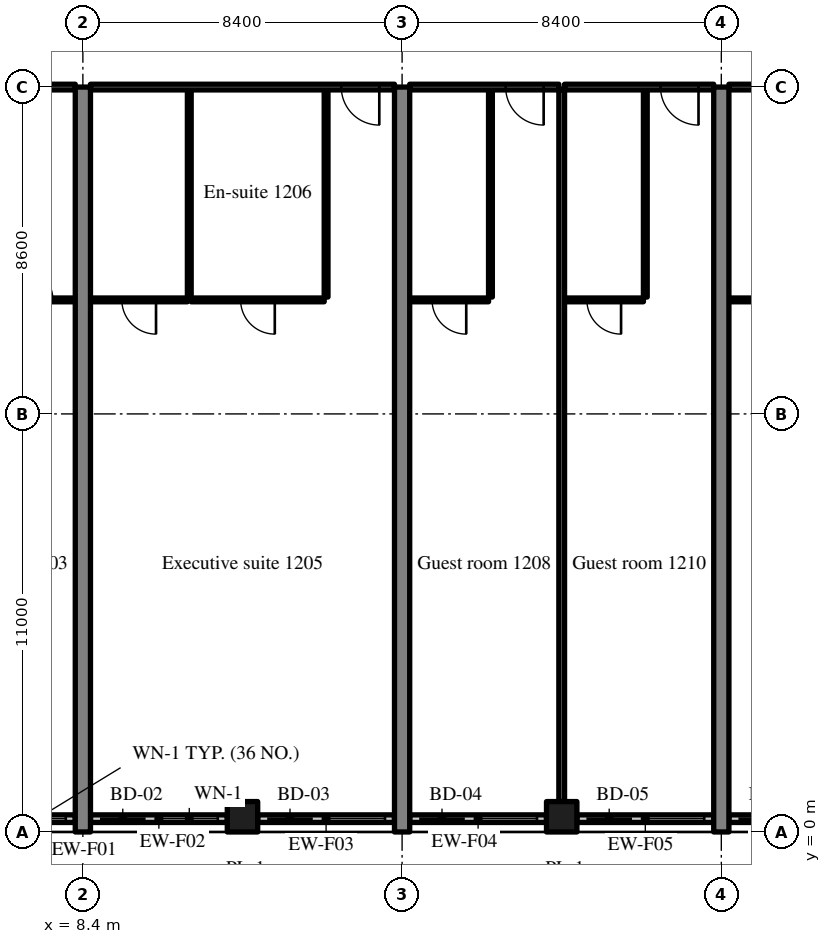
"""IFC4 building model, lengths in metres.
Left out: names, types, materials, properties, quantities, classifications, styles, units other than length and angle.
Written with IfcOpenShell. Run it as: python <this file> out.ifc"""

import sys

from ifc_helpers import new_model, si_unit, direction, frame, frame_2d, origin, origin_2d, place, context, subcontext, project, spatial, rectangle, extrude, source, transform, mapped, element, fill, save


model = new_model("IFC4")
c1 = context("Model", 3, precision=1e-05, world=origin(), true_north=direction((0.0, 1.0)))
c2 = subcontext(c1, "Body", "Model", "MODEL_VIEW")
j1 = project(units=[si_unit("LENGTHUNIT", "METRE"), si_unit("PLANEANGLEUNIT", "RADIAN")], contexts=[c1])
p1 = place(None, origin())
s1 = spatial("IfcSite", under=j1, at=p1, CompositionType="ELEMENT")
p2 = place(p1, origin())
s2 = spatial("IfcBuilding", under=s1, at=p2, CompositionType="ELEMENT")
p3 = place(p2, frame((0.0, 0.0, 54.4)))
s3 = spatial("IfcBuildingStorey", under=s2, at=p3, CompositionType="ELEMENT", Elevation=54.4)
m1 = source(origin(), c2, "Body", "SweptSolid", [
    extrude(rectangle(XDim=19.6, YDim=0.4, at=frame_2d((9.8, 0.0))), origin(), (0.0, 0.0, 1.0), 3.52),
])
for number, where, z_axis, x_axis in (
    (1, (8.4, 0.0, 0.0), (0.0, 0.0, 1.0), (0.0, 1.0, 0.0)),
    (2, (16.8, 0.0, 0.0), (0.0, 0.0, 1.0), (0.0, 1.0, 0.0)),
    (3, (25.2, 0.0, 0.0), (0.0, 0.0, 1.0), (0.0, 1.0, 0.0)),
):
    element("IfcWall", number, at=place(p3, frame(where, z_axis=z_axis, x_axis=x_axis)), inside=s3, PredefinedType="SHEAR", context=c2, shape_type="MappedRepresentation", body=[
        mapped(m1, transform((0.0, 0.0, 0.0), scale=1.0)),
    ])
m2 = source(origin(), c2, "Body", "SweptSolid", [
    extrude(rectangle(XDim=0.8, YDim=0.8, at=origin_2d()), origin(), (0.0, 0.0, 1.0), 3.52),
])
for number, where, z_axis, x_axis in (
    (4, (12.6, 0.4, 0.0), (0.0, 0.0, 1.0), (1.0, 0.0, 0.0)),
    (5, (21.0, 0.4, 0.0), (0.0, 0.0, 1.0), (1.0, 0.0, 0.0)),
):
    element("IfcColumn", number, at=place(p3, frame(where, z_axis=z_axis, x_axis=x_axis)), inside=s3, PredefinedType="COLUMN", context=c2, shape_type="MappedRepresentation", body=[
        mapped(m2, transform((0.0, 0.0, 0.0), scale=1.0)),
    ])
m3 = source(origin(), c2, "Body", "SweptSolid", [
    extrude(rectangle(XDim=4.055, YDim=0.2, at=frame_2d((2.027, 0.0))), origin(), (0.0, 0.0, 1.0), 2.82),
])
p4 = place(p3, frame((4.145, 0.35, 0.0), z_axis=(0.0, 0.0, 1.0), x_axis=(1.0, 0.0, 0.0)))
e6 = element("IfcWall", 6, at=p4, inside=s3, PredefinedType="SOLIDWALL", context=c2, shape_type="MappedRepresentation", body=[
    mapped(m3, transform((0.0, 0.0, 0.0), scale=1.0)),
])
m4 = source(origin(), c2, "Body", "SweptSolid", [
    extrude(rectangle(XDim=1.2, YDim=2.4, at=frame_2d((0.6, 1.2))), frame((0.0, 0.11, 0.0), z_axis=(0.0, -1.0, 0.0), x_axis=(1.0, 0.0, 0.0)), (0.0, 0.0, 1.0), 0.22),
])
p5 = place(p4, frame((0.25, 0.0, 0.0)))
e7 = element("IfcOpeningElement", 7, at=p5, cuts=e6, PredefinedType="OPENING", context=c2, shape_type="MappedRepresentation", body=[
    mapped(m4, transform((0.0, 0.0, 0.0), scale=1.0)),
])
m5 = source(origin(), c2, "Body", "SweptSolid", [
    extrude(rectangle(XDim=1.5, YDim=1.5, at=frame_2d((0.75, 0.75))), frame((0.0, 0.11, 0.0), z_axis=(0.0, -1.0, 0.0), x_axis=(1.0, 0.0, 0.0)), (0.0, 0.0, 1.0), 0.22),
])
p6 = place(p4, frame((2.305, 0.0, 0.9)))
e8 = element("IfcOpeningElement", 8, at=p6, cuts=e6, PredefinedType="OPENING", context=c2, shape_type="MappedRepresentation", body=[
    mapped(m5, transform((0.0, 0.0, 0.0), scale=1.0)),
])
m6 = source(origin(), c2, "Body", "SweptSolid", [
    extrude(rectangle(XDim=3.6, YDim=0.2, at=frame_2d((1.8, 0.0))), origin(), (0.0, 0.0, 1.0), 2.82),
])
p7 = place(p3, frame((8.6, 0.35, 0.0), z_axis=(0.0, 0.0, 1.0), x_axis=(1.0, 0.0, 0.0)))
e9 = element("IfcWall", 9, at=p7, inside=s3, PredefinedType="SOLIDWALL", context=c2, shape_type="MappedRepresentation", body=[
    mapped(m6, transform((0.0, 0.0, 0.0), scale=1.0)),
])
p8 = place(p7, frame((0.25, 0.0, 0.0)))
e10 = element("IfcOpeningElement", 10, at=p8, cuts=e9, PredefinedType="OPENING", context=c2, shape_type="MappedRepresentation", body=[
    mapped(m4, transform((0.0, 0.0, 0.0), scale=1.0)),
])
p9 = place(p7, frame((1.85, 0.0, 0.9)))
e11 = element("IfcOpeningElement", 11, at=p9, cuts=e9, PredefinedType="OPENING", context=c2, shape_type="MappedRepresentation", body=[
    mapped(m5, transform((0.0, 0.0, 0.0), scale=1.0)),
])
m7 = source(origin(), c2, "Body", "SweptSolid", [
    extrude(rectangle(XDim=3.6, YDim=0.2, at=frame_2d((1.8, 0.0))), origin(), (0.0, 0.0, 1.0), 2.82),
])
p10 = place(p3, frame((13.0, 0.35, 0.0), z_axis=(0.0, 0.0, 1.0), x_axis=(1.0, 0.0, 0.0)))
e12 = element("IfcWall", 12, at=p10, inside=s3, PredefinedType="SOLIDWALL", context=c2, shape_type="MappedRepresentation", body=[
    mapped(m7, transform((0.0, 0.0, 0.0), scale=1.0)),
])
p11 = place(p10, frame((0.25, 0.0, 0.0)))
e13 = element("IfcOpeningElement", 13, at=p11, cuts=e12, PredefinedType="OPENING", context=c2, shape_type="MappedRepresentation", body=[
    mapped(m4, transform((0.0, 0.0, 0.0), scale=1.0)),
])
p12 = place(p10, frame((1.85, 0.0, 0.9)))
e14 = element("IfcOpeningElement", 14, at=p12, cuts=e12, PredefinedType="OPENING", context=c2, shape_type="MappedRepresentation", body=[
    mapped(m5, transform((0.0, 0.0, 0.0), scale=1.0)),
])
p13 = place(p3, frame((17.0, 0.35, 0.0), z_axis=(0.0, 0.0, 1.0), x_axis=(1.0, 0.0, 0.0)))
e15 = element("IfcWall", 15, at=p13, inside=s3, PredefinedType="SOLIDWALL", context=c2, shape_type="MappedRepresentation", body=[
    mapped(m7, transform((0.0, 0.0, 0.0), scale=1.0)),
])
p14 = place(p13, frame((0.25, 0.0, 0.0)))
e16 = element("IfcOpeningElement", 16, at=p14, cuts=e15, PredefinedType="OPENING", context=c2, shape_type="MappedRepresentation", body=[
    mapped(m4, transform((0.0, 0.0, 0.0), scale=1.0)),
])
p15 = place(p13, frame((1.85, 0.0, 0.9)))
e17 = element("IfcOpeningElement", 17, at=p15, cuts=e15, PredefinedType="OPENING", context=c2, shape_type="MappedRepresentation", body=[
    mapped(m5, transform((0.0, 0.0, 0.0), scale=1.0)),
])
p16 = place(p3, frame((21.4, 0.35, 0.0), z_axis=(0.0, 0.0, 1.0), x_axis=(1.0, 0.0, 0.0)))
e18 = element("IfcWall", 18, at=p16, inside=s3, PredefinedType="SOLIDWALL", context=c2, shape_type="MappedRepresentation", body=[
    mapped(m7, transform((0.0, 0.0, 0.0), scale=1.0)),
])
p17 = place(p16, frame((0.25, 0.0, 0.0)))
e19 = element("IfcOpeningElement", 19, at=p17, cuts=e18, PredefinedType="OPENING", context=c2, shape_type="MappedRepresentation", body=[
    mapped(m4, transform((0.0, 0.0, 0.0), scale=1.0)),
])
p18 = place(p16, frame((1.85, 0.0, 0.9)))
e20 = element("IfcOpeningElement", 20, at=p18, cuts=e18, PredefinedType="OPENING", context=c2, shape_type="MappedRepresentation", body=[
    mapped(m5, transform((0.0, 0.0, 0.0), scale=1.0)),
])
p19 = place(p3, frame((25.4, 0.35, 0.0), z_axis=(0.0, 0.0, 1.0), x_axis=(1.0, 0.0, 0.0)))
e21 = element("IfcWall", 21, at=p19, inside=s3, PredefinedType="SOLIDWALL", context=c2, shape_type="MappedRepresentation", body=[
    mapped(m7, transform((0.0, 0.0, 0.0), scale=1.0)),
])
p20 = place(p19, frame((0.25, 0.0, 0.0)))
e22 = element("IfcOpeningElement", 22, at=p20, cuts=e21, PredefinedType="OPENING", context=c2, shape_type="MappedRepresentation", body=[
    mapped(m4, transform((0.0, 0.0, 0.0), scale=1.0)),
])
p21 = place(p19, frame((1.85, 0.0, 0.9)))
e23 = element("IfcOpeningElement", 23, at=p21, cuts=e21, PredefinedType="OPENING", context=c2, shape_type="MappedRepresentation", body=[
    mapped(m5, transform((0.0, 0.0, 0.0), scale=1.0)),
])
m8 = source(origin(), c2, "Body", "SweptSolid", [
    extrude(rectangle(XDim=2.075, YDim=0.1, at=frame_2d((1.038, 0.0))), origin(), (0.0, 0.0, 1.0), 3.52),
])
p22 = place(p3, frame((6.125, 14.0, 0.0), z_axis=(0.0, 0.0, 1.0), x_axis=(1.0, 0.0, 0.0)))
e24 = element("IfcWall", 24, at=p22, inside=s3, PredefinedType="PARTITIONING", context=c2, shape_type="MappedRepresentation", body=[
    mapped(m8, transform((0.0, 0.0, 0.0), scale=1.0)),
])
m9 = source(origin(), c2, "Body", "SweptSolid", [
    extrude(rectangle(XDim=0.9, YDim=2.1, at=frame_2d((0.45, 1.05))), frame((0.0, 0.06, 0.0), z_axis=(0.0, -1.0, 0.0), x_axis=(1.0, 0.0, 0.0)), (0.0, 0.0, 1.0), 0.12),
])
p23 = place(p22, frame((0.587, 0.0, 0.0)))
e25 = element("IfcOpeningElement", 25, at=p23, cuts=e24, PredefinedType="OPENING", context=c2, shape_type="MappedRepresentation", body=[
    mapped(m9, transform((0.0, 0.0, 0.0), scale=1.0)),
])
m10 = source(origin(), c2, "Body", "SweptSolid", [
    extrude(rectangle(XDim=3.925, YDim=0.15, at=frame_2d((1.962, 0.0))), origin(), (0.0, 0.0, 1.0), 2.82),
])
p24 = place(p3, frame((4.275, 19.6, 0.0), z_axis=(0.0, 0.0, 1.0), x_axis=(1.0, 0.0, 0.0)))
e26 = element("IfcWall", 26, at=p24, inside=s3, PredefinedType="PARTITIONING", context=c2, shape_type="MappedRepresentation", body=[
    mapped(m10, transform((0.0, 0.0, 0.0), scale=1.0)),
])
m11 = source(origin(), c2, "Body", "SweptSolid", [
    extrude(rectangle(XDim=1.0, YDim=2.1, at=frame_2d((0.5, 1.05))), frame((0.0, 0.085, 0.0), z_axis=(0.0, -1.0, 0.0), x_axis=(1.0, 0.0, 0.0)), (0.0, 0.0, 1.0), 0.17),
])
p25 = place(p24, frame((0.4, 0.0, 0.0)))
e27 = element("IfcOpeningElement", 27, at=p25, cuts=e26, PredefinedType="OPENING", context=c2, shape_type="MappedRepresentation", body=[
    mapped(m11, transform((0.0, 0.0, 0.0), scale=1.0)),
])
m12 = source(origin(), c2, "Body", "SweptSolid", [
    extrude(rectangle(XDim=5.45, YDim=0.1, at=frame_2d((2.725, 0.0))), origin(), (0.0, 0.0, 1.0), 3.52),
])
for number, where, z_axis, x_axis in (
    (28, (14.8, 14.075, 0.0), (0.0, 0.0, 1.0), (0.0, 1.0, 0.0)),
    (29, (11.2, 14.075, 0.0), (0.0, 0.0, 1.0), (0.0, 1.0, 0.0)),
):
    element("IfcWall", number, at=place(p3, frame(where, z_axis=z_axis, x_axis=x_axis)), inside=s3, PredefinedType="PARTITIONING", context=c2, shape_type="MappedRepresentation", body=[
        mapped(m12, transform((0.0, 0.0, 0.0), scale=1.0)),
    ])
m13 = source(origin(), c2, "Body", "SweptSolid", [
    extrude(rectangle(XDim=3.5, YDim=0.1, at=frame_2d((1.75, 0.0))), origin(), (0.0, 0.0, 1.0), 3.52),
])
p26 = place(p3, frame((11.25, 14.0, 0.0), z_axis=(0.0, 0.0, 1.0), x_axis=(1.0, 0.0, 0.0)))
e30 = element("IfcWall", 30, at=p26, inside=s3, PredefinedType="PARTITIONING", context=c2, shape_type="MappedRepresentation", body=[
    mapped(m13, transform((0.0, 0.0, 0.0), scale=1.0)),
])
p27 = place(p26, frame((1.3, 0.0, 0.0)))
e31 = element("IfcOpeningElement", 31, at=p27, cuts=e30, PredefinedType="OPENING", context=c2, shape_type="MappedRepresentation", body=[
    mapped(m9, transform((0.0, 0.0, 0.0), scale=1.0)),
])
m14 = source(origin(), c2, "Body", "SweptSolid", [
    extrude(rectangle(XDim=2.55, YDim=0.1, at=frame_2d((1.275, 0.0))), origin(), (0.0, 0.0, 1.0), 3.52),
])
p28 = place(p3, frame((8.6, 14.0, 0.0), z_axis=(0.0, 0.0, 1.0), x_axis=(1.0, 0.0, 0.0)))
e32 = element("IfcWall", 32, at=p28, inside=s3, PredefinedType="PARTITIONING", context=c2, shape_type="MappedRepresentation", body=[
    mapped(m14, transform((0.0, 0.0, 0.0), scale=1.0)),
])
p29 = place(p28, frame((0.825, 0.0, 0.0)))
e33 = element("IfcOpeningElement", 33, at=p29, cuts=e32, PredefinedType="OPENING", context=c2, shape_type="MappedRepresentation", body=[
    mapped(m9, transform((0.0, 0.0, 0.0), scale=1.0)),
])
m15 = source(origin(), c2, "Body", "SweptSolid", [
    extrude(rectangle(XDim=8.0, YDim=0.15, at=frame_2d((4.0, 0.0))), origin(), (0.0, 0.0, 1.0), 2.82),
])
p30 = place(p3, frame((8.6, 19.6, 0.0), z_axis=(0.0, 0.0, 1.0), x_axis=(1.0, 0.0, 0.0)))
e34 = element("IfcWall", 34, at=p30, inside=s3, PredefinedType="PARTITIONING", context=c2, shape_type="MappedRepresentation", body=[
    mapped(m15, transform((0.0, 0.0, 0.0), scale=1.0)),
])
p31 = place(p30, frame((6.6, 0.0, 0.0)))
e35 = element("IfcOpeningElement", 35, at=p31, cuts=e34, PredefinedType="OPENING", context=c2, shape_type="MappedRepresentation", body=[
    mapped(m11, transform((0.0, 0.0, 0.0), scale=1.0)),
])
p32 = place(p3, frame((19.125, 14.075, 0.0), z_axis=(0.0, 0.0, 1.0), x_axis=(0.0, 1.0, 0.0)))
e36 = element("IfcWall", 36, at=p32, inside=s3, PredefinedType="PARTITIONING", context=c2, shape_type="MappedRepresentation", body=[
    mapped(m12, transform((0.0, 0.0, 0.0), scale=1.0)),
])
p33 = place(p3, frame((17.0, 14.0, 0.0), z_axis=(0.0, 0.0, 1.0), x_axis=(1.0, 0.0, 0.0)))
e37 = element("IfcWall", 37, at=p33, inside=s3, PredefinedType="PARTITIONING", context=c2, shape_type="MappedRepresentation", body=[
    mapped(m8, transform((0.0, 0.0, 0.0), scale=1.0)),
])
p34 = place(p33, frame((0.588, 0.0, 0.0)))
e38 = element("IfcOpeningElement", 38, at=p34, cuts=e37, PredefinedType="OPENING", context=c2, shape_type="MappedRepresentation", body=[
    mapped(m9, transform((0.0, 0.0, 0.0), scale=1.0)),
])
p35 = place(p3, frame((17.0, 19.6, 0.0), z_axis=(0.0, 0.0, 1.0), x_axis=(1.0, 0.0, 0.0)))
e39 = element("IfcWall", 39, at=p35, inside=s3, PredefinedType="PARTITIONING", context=c2, shape_type="MappedRepresentation", body=[
    mapped(m10, transform((0.0, 0.0, 0.0), scale=1.0)),
])
p36 = place(p35, frame((2.525, 0.0, 0.0)))
e40 = element("IfcOpeningElement", 40, at=p36, cuts=e39, PredefinedType="OPENING", context=c2, shape_type="MappedRepresentation", body=[
    mapped(m11, transform((0.0, 0.0, 0.0), scale=1.0)),
])
p37 = place(p3, frame((23.2, 14.075, 0.0), z_axis=(0.0, 0.0, 1.0), x_axis=(0.0, 1.0, 0.0)))
e41 = element("IfcWall", 41, at=p37, inside=s3, PredefinedType="PARTITIONING", context=c2, shape_type="MappedRepresentation", body=[
    mapped(m12, transform((0.0, 0.0, 0.0), scale=1.0)),
])
p38 = place(p3, frame((21.075, 14.0, 0.0), z_axis=(0.0, 0.0, 1.0), x_axis=(1.0, 0.0, 0.0)))
e42 = element("IfcWall", 42, at=p38, inside=s3, PredefinedType="PARTITIONING", context=c2, shape_type="MappedRepresentation", body=[
    mapped(m8, transform((0.0, 0.0, 0.0), scale=1.0)),
])
p39 = place(p38, frame((0.587, 0.0, 0.0)))
e43 = element("IfcOpeningElement", 43, at=p39, cuts=e42, PredefinedType="OPENING", context=c2, shape_type="MappedRepresentation", body=[
    mapped(m9, transform((0.0, 0.0, 0.0), scale=1.0)),
])
p40 = place(p3, frame((21.075, 19.6, 0.0), z_axis=(0.0, 0.0, 1.0), x_axis=(1.0, 0.0, 0.0)))
e44 = element("IfcWall", 44, at=p40, inside=s3, PredefinedType="PARTITIONING", context=c2, shape_type="MappedRepresentation", body=[
    mapped(m10, transform((0.0, 0.0, 0.0), scale=1.0)),
])
p41 = place(p40, frame((2.525, 0.0, 0.0)))
e45 = element("IfcOpeningElement", 45, at=p41, cuts=e44, PredefinedType="OPENING", context=c2, shape_type="MappedRepresentation", body=[
    mapped(m11, transform((0.0, 0.0, 0.0), scale=1.0)),
])
m16 = source(origin(), c2, "Body", "SweptSolid", [
    extrude(rectangle(XDim=18.725, YDim=0.15, at=frame_2d((9.362, 0.0))), origin(), (0.0, 0.0, 1.0), 3.52),
])
p42 = place(p3, frame((21.0, 0.8, 0.0), z_axis=(0.0, 0.0, 1.0), x_axis=(0.0, 1.0, 0.0)))
e46 = element("IfcWall", 46, at=p42, inside=s3, PredefinedType="PARTITIONING", context=c2, shape_type="MappedRepresentation", body=[
    mapped(m16, transform((0.0, 0.0, 0.0), scale=1.0)),
])
m17 = source(origin(), c2, "Body", "SweptSolid", [
    extrude(rectangle(XDim=2.55, YDim=0.1, at=frame_2d((1.275, 0.0))), origin(), (0.0, 0.0, 1.0), 3.52),
])
p43 = place(p3, frame((25.4, 14.0, 0.0), z_axis=(0.0, 0.0, 1.0), x_axis=(1.0, 0.0, 0.0)))
e47 = element("IfcWall", 47, at=p43, inside=s3, PredefinedType="PARTITIONING", context=c2, shape_type="MappedRepresentation", body=[
    mapped(m17, transform((0.0, 0.0, 0.0), scale=1.0)),
])
p44 = place(p43, frame((0.825, 0.0, 0.0)))
e48 = element("IfcOpeningElement", 48, at=p44, cuts=e47, PredefinedType="OPENING", context=c2, shape_type="MappedRepresentation", body=[
    mapped(m9, transform((0.0, 0.0, 0.0), scale=1.0)),
])
p45 = place(p3, frame((25.4, 19.6, 0.0), z_axis=(0.0, 0.0, 1.0), x_axis=(1.0, 0.0, 0.0)))
e49 = element("IfcWall", 49, at=p45, inside=s3, PredefinedType="PARTITIONING", context=c2, shape_type="MappedRepresentation", body=[
    mapped(m15, transform((0.0, 0.0, 0.0), scale=1.0)),
])
p46 = place(p45, frame((6.6, 0.0, 0.0)))
e50 = element("IfcOpeningElement", 50, at=p46, cuts=e49, PredefinedType="OPENING", context=c2, shape_type="MappedRepresentation", body=[
    mapped(m11, transform((0.0, 0.0, 0.0), scale=1.0)),
])
m18 = source(origin(), c2, "Body", "SweptSolid", [
    extrude(rectangle(XDim=1.5, YDim=1.5, at=frame_2d((0.75, 0.75))), frame((0.0, 0.03, 0.0), z_axis=(0.0, -1.0, 0.0), x_axis=(1.0, 0.0, 0.0)), (0.0, 0.0, 1.0), 0.06),
])
p47 = place(p6, origin())
e51 = element("IfcWindow", 51, at=p47, inside=s3, PartitioningType="SINGLE_PANEL", PredefinedType="WINDOW", context=c2, shape_type="MappedRepresentation", body=[
    mapped(m18, transform((0.0, 0.0, 0.0), scale=1.0)),
])
fill(e8, e51)
m19 = source(origin(), c2, "Body", "SweptSolid", [
    extrude(rectangle(XDim=1.2, YDim=2.4, at=frame_2d((0.6, 1.2))), frame((0.0, 0.025, 0.0), z_axis=(0.0, -1.0, 0.0), x_axis=(1.0, 0.0, 0.0)), (0.0, 0.0, 1.0), 0.05),
])
p48 = place(p8, origin())
e52 = element("IfcDoor", 52, at=p48, inside=s3, OperationType="SLIDING_TO_RIGHT", PredefinedType="DOOR", context=c2, shape_type="MappedRepresentation", body=[
    mapped(m19, transform((0.0, 0.0, 0.0), scale=1.0)),
])
fill(e10, e52)
p49 = place(p9, origin())
e53 = element("IfcWindow", 53, at=p49, inside=s3, PartitioningType="SINGLE_PANEL", PredefinedType="WINDOW", context=c2, shape_type="MappedRepresentation", body=[
    mapped(m18, transform((0.0, 0.0, 0.0), scale=1.0)),
])
fill(e11, e53)
p50 = place(p11, origin())
e54 = element("IfcDoor", 54, at=p50, inside=s3, OperationType="SLIDING_TO_LEFT", PredefinedType="DOOR", context=c2, shape_type="MappedRepresentation", body=[
    mapped(m19, transform((0.0, 0.0, 0.0), scale=1.0)),
])
fill(e13, e54)
p51 = place(p12, origin())
e55 = element("IfcWindow", 55, at=p51, inside=s3, PartitioningType="SINGLE_PANEL", PredefinedType="WINDOW", context=c2, shape_type="MappedRepresentation", body=[
    mapped(m18, transform((0.0, 0.0, 0.0), scale=1.0)),
])
fill(e14, e55)
p52 = place(p14, origin())
e56 = element("IfcDoor", 56, at=p52, inside=s3, OperationType="SLIDING_TO_RIGHT", PredefinedType="DOOR", context=c2, shape_type="MappedRepresentation", body=[
    mapped(m19, transform((0.0, 0.0, 0.0), scale=1.0)),
])
fill(e16, e56)
p53 = place(p15, origin())
e57 = element("IfcWindow", 57, at=p53, inside=s3, PartitioningType="SINGLE_PANEL", PredefinedType="WINDOW", context=c2, shape_type="MappedRepresentation", body=[
    mapped(m18, transform((0.0, 0.0, 0.0), scale=1.0)),
])
fill(e17, e57)
p54 = place(p17, origin())
e58 = element("IfcDoor", 58, at=p54, inside=s3, OperationType="SLIDING_TO_LEFT", PredefinedType="DOOR", context=c2, shape_type="MappedRepresentation", body=[
    mapped(m19, transform((0.0, 0.0, 0.0), scale=1.0)),
])
fill(e19, e58)
p55 = place(p18, origin())
e59 = element("IfcWindow", 59, at=p55, inside=s3, PartitioningType="SINGLE_PANEL", PredefinedType="WINDOW", context=c2, shape_type="MappedRepresentation", body=[
    mapped(m18, transform((0.0, 0.0, 0.0), scale=1.0)),
])
fill(e20, e59)
p56 = place(p20, origin())
e60 = element("IfcDoor", 60, at=p56, inside=s3, OperationType="SLIDING_TO_RIGHT", PredefinedType="DOOR", context=c2, shape_type="MappedRepresentation", body=[
    mapped(m19, transform((0.0, 0.0, 0.0), scale=1.0)),
])
fill(e22, e60)
m20 = source(origin(), c2, "Body", "SweptSolid", [
    extrude(rectangle(XDim=0.9, YDim=2.1, at=frame_2d((0.45, 1.05))), frame((0.0, 0.025, 0.0), z_axis=(0.0, -1.0, 0.0), x_axis=(1.0, 0.0, 0.0)), (0.0, 0.0, 1.0), 0.05),
])
p57 = place(p23, origin())
e61 = element("IfcDoor", 61, at=p57, inside=s3, OperationType="SINGLE_SWING_LEFT", PredefinedType="DOOR", context=c2, shape_type="MappedRepresentation", body=[
    mapped(m20, transform((0.0, 0.0, 0.0), scale=1.0)),
])
fill(e25, e61)
p58 = place(p27, origin())
e62 = element("IfcDoor", 62, at=p58, inside=s3, OperationType="SINGLE_SWING_RIGHT", PredefinedType="DOOR", context=c2, shape_type="MappedRepresentation", body=[
    mapped(m20, transform((0.0, 0.0, 0.0), scale=1.0)),
])
fill(e31, e62)
p59 = place(p29, origin())
e63 = element("IfcDoor", 63, at=p59, inside=s3, OperationType="SINGLE_SWING_RIGHT", PredefinedType="DOOR", context=c2, shape_type="MappedRepresentation", body=[
    mapped(m20, transform((0.0, 0.0, 0.0), scale=1.0)),
])
fill(e33, e63)
m21 = source(origin(), c2, "Body", "SweptSolid", [
    extrude(rectangle(XDim=1.0, YDim=2.1, at=frame_2d((0.5, 1.05))), frame((0.0, 0.025, 0.0), z_axis=(0.0, -1.0, 0.0), x_axis=(1.0, 0.0, 0.0)), (0.0, 0.0, 1.0), 0.05),
])
p60 = place(p31, origin())
e64 = element("IfcDoor", 64, at=p60, inside=s3, OperationType="SINGLE_SWING_RIGHT", PredefinedType="DOOR", context=c2, shape_type="MappedRepresentation", body=[
    mapped(m21, transform((0.0, 0.0, 0.0), scale=1.0)),
])
fill(e35, e64)
p61 = place(p34, origin())
e65 = element("IfcDoor", 65, at=p61, inside=s3, OperationType="SINGLE_SWING_RIGHT", PredefinedType="DOOR", context=c2, shape_type="MappedRepresentation", body=[
    mapped(m20, transform((0.0, 0.0, 0.0), scale=1.0)),
])
fill(e38, e65)
p62 = place(p36, origin())
e66 = element("IfcDoor", 66, at=p62, inside=s3, OperationType="SINGLE_SWING_RIGHT", PredefinedType="DOOR", context=c2, shape_type="MappedRepresentation", body=[
    mapped(m21, transform((0.0, 0.0, 0.0), scale=1.0)),
])
fill(e40, e66)
p63 = place(p39, origin())
e67 = element("IfcDoor", 67, at=p63, inside=s3, OperationType="SINGLE_SWING_RIGHT", PredefinedType="DOOR", context=c2, shape_type="MappedRepresentation", body=[
    mapped(m20, transform((0.0, 0.0, 0.0), scale=1.0)),
])
fill(e43, e67)
p64 = place(p41, origin())
e68 = element("IfcDoor", 68, at=p64, inside=s3, OperationType="SINGLE_SWING_RIGHT", PredefinedType="DOOR", context=c2, shape_type="MappedRepresentation", body=[
    mapped(m21, transform((0.0, 0.0, 0.0), scale=1.0)),
])
fill(e45, e68)
save(model, sys.argv[1])
